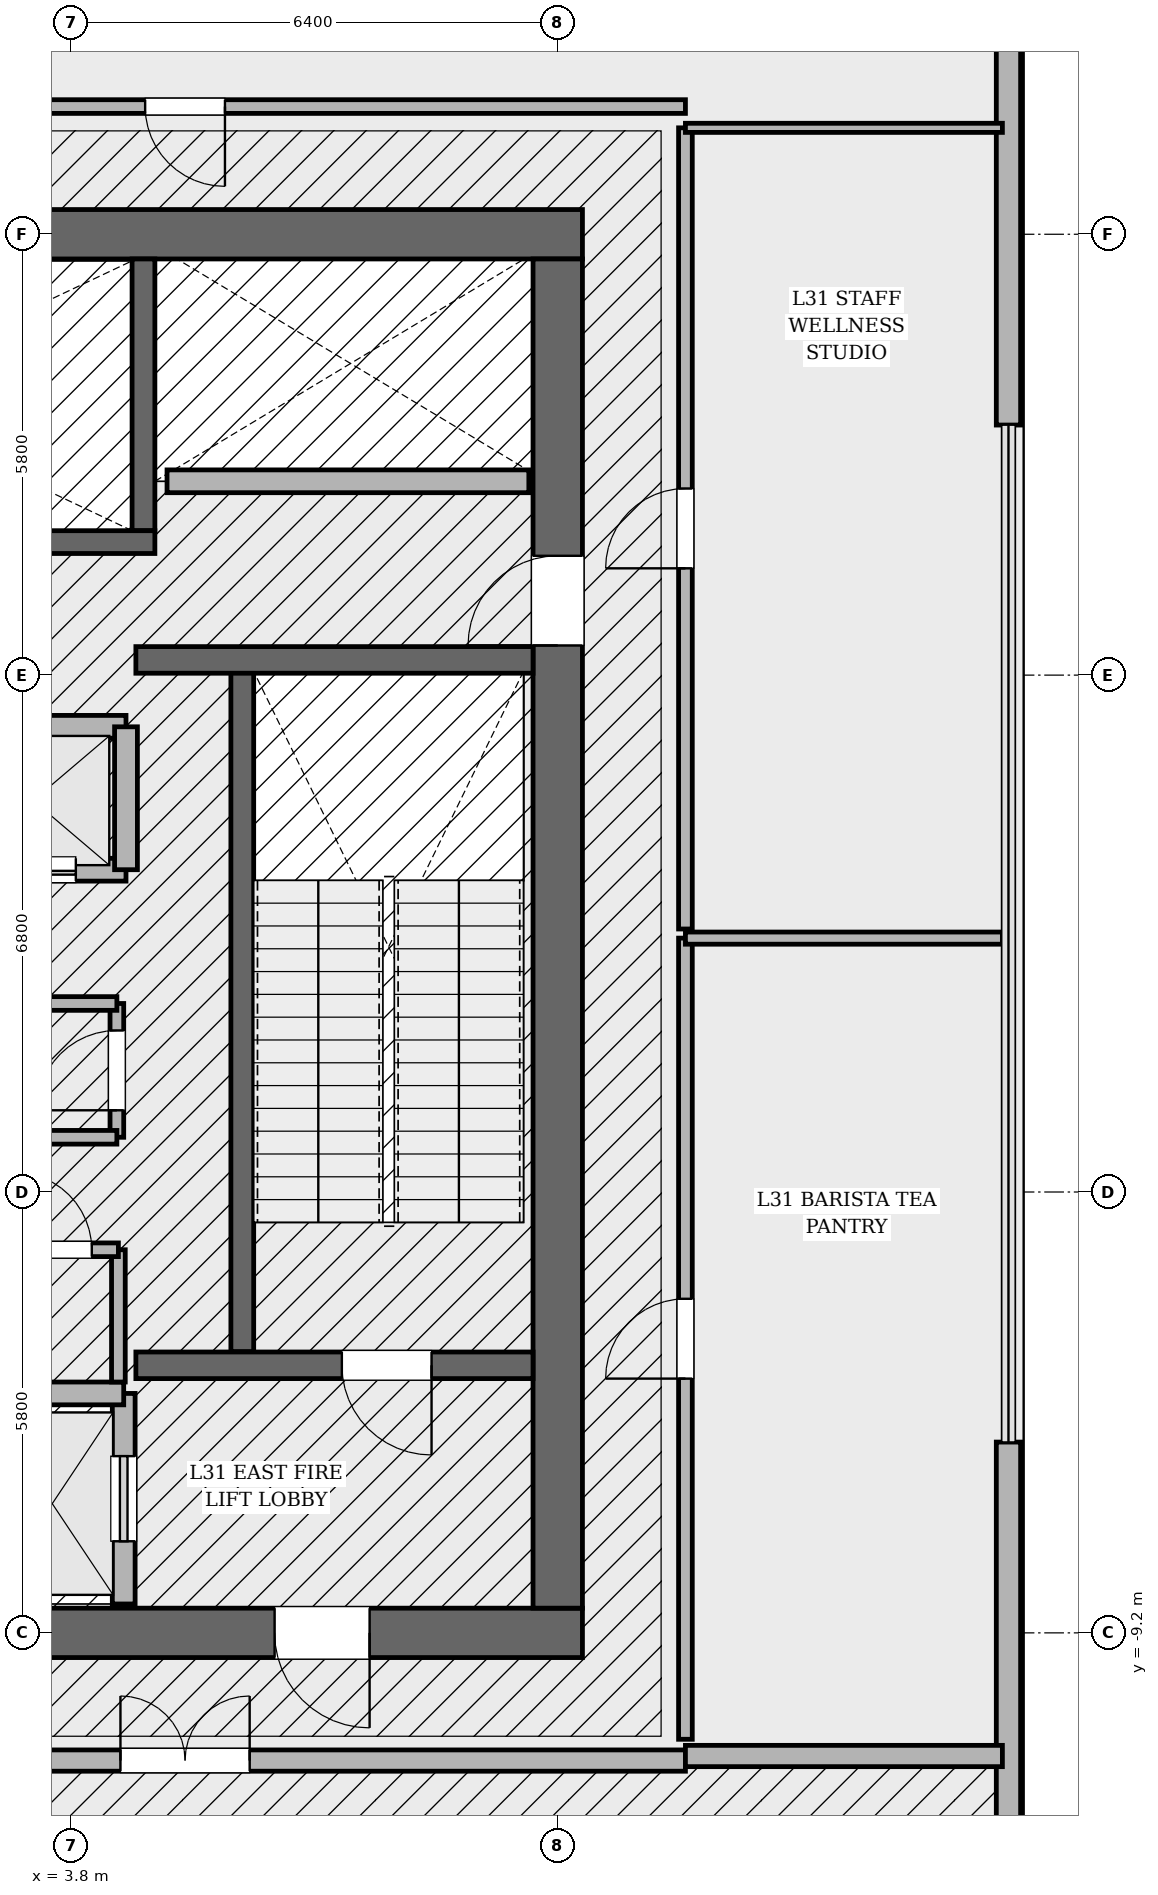
"""IFC4 building model, lengths in metres.
Left out: names, types, materials, properties, quantities, classifications, styles, units other than length and angle.
Written with IfcOpenShell. Run it as: python <this file> out.ifc"""

import sys

from ifc_helpers import new_model, si_unit, direction, frame, frame_2d, origin, place, context, subcontext, project, spatial, rectangle, extrude, element, fill, save


model = new_model("IFC4")
c1 = context("Model", 3, precision=1e-05, world=origin(), true_north=direction((0.0, 1.0)))
c2 = subcontext(c1, "Body", "Model", "MODEL_VIEW")
j1 = project(units=[si_unit("LENGTHUNIT", "METRE"), si_unit("PLANEANGLEUNIT", "RADIAN")], contexts=[c1])
p1 = place(None, origin())
s1 = spatial("IfcSite", under=j1, at=p1, CompositionType="ELEMENT")
p2 = place(p1, origin())
s2 = spatial("IfcBuilding", under=s1, at=p2, CompositionType="ELEMENT")
p3 = place(p2, frame((0.0, 0.0, 135.0)))
s3 = spatial("IfcBuildingStorey", under=s2, at=p3, CompositionType="ELEMENT", Elevation=135.0)
p4 = place(p3, frame((10.525, -9.2, 0.0), z_axis=(0.0, 0.0, 1.0), x_axis=(-1.0, 0.0, 0.0)))
e1 = element("IfcWall", 1, at=p4, inside=s3, PredefinedType="SHEAR", context=c2, shape_type="SweptSolid", body=[
    extrude(rectangle(XDim=21.05, YDim=0.65, at=frame_2d((10.525, 0.0))), origin(), (0.0, 0.0, 1.0), 4.8),
])
p5 = place(p4, frame((2.8, 0.0, 0.0)))
e2 = element("IfcOpeningElement", 2, at=p5, cuts=e1, PredefinedType="OPENING", context=c2, shape_type="SweptSolid", body=[
    extrude(rectangle(XDim=1.25, YDim=2.25, at=frame_2d((0.625, 1.125))), frame((0.0, 0.335, 0.0), z_axis=(0.0, -1.0, 0.0), x_axis=(1.0, 0.0, 0.0)), (0.0, 0.0, 1.0), 0.67),
])
p6 = place(p4, frame((17.0, 0.0, 0.0)))
e3 = element("IfcOpeningElement", 3, at=p6, cuts=e1, PredefinedType="OPENING", context=c2, shape_type="SweptSolid", body=[
    extrude(rectangle(XDim=1.25, YDim=2.25, at=frame_2d((0.625, 1.125))), frame((0.0, 0.335, 0.0), z_axis=(0.0, -1.0, 0.0), x_axis=(1.0, 0.0, 0.0)), (0.0, 0.0, 1.0), 0.67),
])
p7 = place(p3, frame((-10.525, 9.2, 0.0), z_axis=(0.0, 0.0, 1.0), x_axis=(1.0, 0.0, 0.0)))
e4 = element("IfcWall", 4, at=p7, inside=s3, PredefinedType="SHEAR", context=c2, shape_type="SweptSolid", body=[
    extrude(rectangle(XDim=21.05, YDim=0.65, at=frame_2d((10.525, 0.0))), origin(), (0.0, 0.0, 1.0), 4.8),
])
p8 = place(p3, frame((10.2, 8.875, 0.0), z_axis=(0.0, 0.0, 1.0), x_axis=(0.0, -1.0, 0.0)))
e5 = element("IfcWall", 5, at=p8, inside=s3, PredefinedType="SHEAR", context=c2, shape_type="SweptSolid", body=[
    extrude(rectangle(XDim=17.75, YDim=0.65, at=frame_2d((8.875, 0.0))), origin(), (0.0, 0.0, 1.0), 4.8),
])
p9 = place(p8, frame((3.905, 0.0, 0.0)))
e6 = element("IfcOpeningElement", 6, at=p9, cuts=e5, PredefinedType="OPENING", context=c2, shape_type="SweptSolid", body=[
    extrude(rectangle(XDim=1.18, YDim=2.2, at=frame_2d((0.59, 1.1))), frame((0.0, 0.335, 0.0), z_axis=(0.0, -1.0, 0.0), x_axis=(1.0, 0.0, 0.0)), (0.0, 0.0, 1.0), 0.67),
])
p10 = place(p3, frame((6.05, 3.45, 0.0), z_axis=(0.0, 0.0, 1.0), x_axis=(0.0, -1.0, 0.0)))
e7 = element("IfcWall", 7, at=p10, inside=s3, PredefinedType="SOLIDWALL", context=c2, shape_type="SweptSolid", body=[
    extrude(rectangle(XDim=8.95, YDim=0.3, at=frame_2d((4.475, 0.0))), origin(), (0.0, 0.0, 1.0), 4.8),
])
p11 = place(p3, frame((4.75, 8.875, 0.0), z_axis=(0.0, 0.0, 1.0), x_axis=(0.0, -1.0, 0.0)))
e8 = element("IfcWall", 8, at=p11, inside=s3, PredefinedType="SOLIDWALL", context=c2, shape_type="SweptSolid", body=[
    extrude(rectangle(XDim=3.575, YDim=0.3, at=frame_2d((1.788, 0.0))), origin(), (0.0, 0.0, 1.0), 4.8),
])
p12 = place(p3, frame((-4.9, 5.15, 0.0), z_axis=(0.0, 0.0, 1.0), x_axis=(1.0, 0.0, 0.0)))
e9 = element("IfcWall", 9, at=p12, inside=s3, PredefinedType="SOLIDWALL", context=c2, shape_type="SweptSolid", body=[
    extrude(rectangle(XDim=9.8, YDim=0.3, at=frame_2d((4.9, 0.0))), origin(), (0.0, 0.0, 1.0), 4.8),
])
p13 = place(p12, frame((0.56, 0.0, 0.0)))
e10 = element("IfcOpeningElement", 10, at=p13, cuts=e9, PredefinedType="OPENING", context=c2, shape_type="SweptSolid", body=[
    extrude(rectangle(XDim=1.18, YDim=2.2, at=frame_2d((0.59, 1.1))), frame((0.0, 0.16, 0.0), z_axis=(0.0, -1.0, 0.0), x_axis=(1.0, 0.0, 0.0)), (0.0, 0.0, 1.0), 0.32),
])
p14 = place(p3, frame((4.65, -5.68, 0.0), z_axis=(0.0, 0.0, 1.0), x_axis=(1.0, 0.0, 0.0)))
e11 = element("IfcWall", 11, at=p14, inside=s3, PredefinedType="SOLIDWALL", context=c2, shape_type="SweptSolid", body=[
    extrude(rectangle(XDim=5.225, YDim=0.35, at=frame_2d((2.613, 0.0))), origin(), (0.0, 0.0, 1.0), 4.8),
])
p15 = place(p14, frame((2.71, 0.0, 0.0)))
e12 = element("IfcOpeningElement", 12, at=p15, cuts=e11, PredefinedType="OPENING", context=c2, shape_type="SweptSolid", body=[
    extrude(rectangle(XDim=1.18, YDim=2.2, at=frame_2d((0.59, 1.1))), frame((0.0, 0.185, 0.0), z_axis=(0.0, -1.0, 0.0), x_axis=(1.0, 0.0, 0.0)), (0.0, 0.0, 1.0), 0.37),
])
p16 = place(p3, frame((4.65, 3.6, 0.0), z_axis=(0.0, 0.0, 1.0), x_axis=(1.0, 0.0, 0.0)))
e13 = element("IfcWall", 13, at=p16, inside=s3, PredefinedType="SOLIDWALL", context=c2, shape_type="SweptSolid", body=[
    extrude(rectangle(XDim=5.225, YDim=0.35, at=frame_2d((2.613, 0.0))), origin(), (0.0, 0.0, 1.0), 4.8),
])
for number, where, z_axis, x_axis in (
    (14, (16.13, -13.727, 0.0), (0.0, 0.0, 1.0), (0.0, 1.0, 0.0)),
    (15, (16.13, 6.69, 0.0), (0.0, 0.0, 1.0), (0.0, 1.0, 0.0)),
):
    element("IfcWall", number, at=place(p3, frame(where, z_axis=z_axis, x_axis=x_axis)), inside=s3, PredefinedType="SOLIDWALL", context=c2, shape_type="SweptSolid", body=[
        extrude(rectangle(XDim=7.037, YDim=0.32, at=frame_2d((3.519, 0.0))), origin(), (0.0, 0.0, 1.0), 3.194),
    ])
p17 = place(p3, frame((4.49, -8.82, 0.0), z_axis=(0.0, 0.0, 1.0), x_axis=(0.0, 1.0, 0.0)))
e16 = element("IfcWall", 16, at=p17, inside=s3, PredefinedType="SOLIDWALL", context=c2, shape_type="SweptSolid", body=[
    extrude(rectangle(XDim=2.77, YDim=0.3, at=frame_2d((1.385, 0.0))), origin(), (0.0, 0.0, 1.0), 4.52),
])
p18 = place(p17, frame((0.825, 0.0, 0.0)))
e17 = element("IfcOpeningElement", 17, at=p18, cuts=e16, PredefinedType="OPENING", context=c2, shape_type="SweptSolid", body=[
    extrude(rectangle(XDim=1.12, YDim=2.25, at=frame_2d((0.56, 1.125))), frame((0.0, 0.16, 0.0), z_axis=(0.0, -1.0, 0.0), x_axis=(1.0, 0.0, 0.0)), (0.0, 0.0, 1.0), 0.32),
])
p19 = place(p3, frame((2.61, -6.05, 0.0), z_axis=(0.0, 0.0, 1.0), x_axis=(1.0, 0.0, 0.0)))
e18 = element("IfcWall", 18, at=p19, inside=s3, PredefinedType="SOLIDWALL", context=c2, shape_type="SweptSolid", body=[
    extrude(rectangle(XDim=1.88, YDim=0.3, at=frame_2d((0.94, 0.0))), origin(), (0.0, 0.0, 1.0), 4.52),
])
p20 = place(p3, frame((-4.52, 0.84, 0.0), z_axis=(0.0, 0.0, 1.0), x_axis=(1.0, 0.0, 0.0)))
e19 = element("IfcWall", 19, at=p20, inside=s3, PredefinedType="SOLIDWALL", context=c2, shape_type="SweptSolid", body=[
    extrude(rectangle(XDim=9.04, YDim=0.3, at=frame_2d((4.52, 0.0))), origin(), (0.0, 0.0, 1.0), 4.52),
])
p21 = place(p20, frame((0.66, 0.0, 0.0)))
e20 = element("IfcOpeningElement", 20, at=p21, cuts=e19, PredefinedType="OPENING", context=c2, shape_type="SweptSolid", body=[
    extrude(rectangle(XDim=1.12, YDim=2.25, at=frame_2d((0.56, 1.125))), frame((0.0, 0.16, 0.0), z_axis=(0.0, -1.0, 0.0), x_axis=(1.0, 0.0, 0.0)), (0.0, 0.0, 1.0), 0.32),
])
p22 = place(p20, frame((2.86, 0.0, 0.0)))
e21 = element("IfcOpeningElement", 21, at=p22, cuts=e19, PredefinedType="OPENING", context=c2, shape_type="SweptSolid", body=[
    extrude(rectangle(XDim=1.12, YDim=2.25, at=frame_2d((0.56, 1.125))), frame((0.0, 0.16, 0.0), z_axis=(0.0, -1.0, 0.0), x_axis=(1.0, 0.0, 0.0)), (0.0, 0.0, 1.0), 0.32),
])
p23 = place(p20, frame((5.06, 0.0, 0.0)))
e22 = element("IfcOpeningElement", 22, at=p23, cuts=e19, PredefinedType="OPENING", context=c2, shape_type="SweptSolid", body=[
    extrude(rectangle(XDim=1.12, YDim=2.25, at=frame_2d((0.56, 1.125))), frame((0.0, 0.16, 0.0), z_axis=(0.0, -1.0, 0.0), x_axis=(1.0, 0.0, 0.0)), (0.0, 0.0, 1.0), 0.32),
])
p24 = place(p20, frame((7.26, 0.0, 0.0)))
e23 = element("IfcOpeningElement", 23, at=p24, cuts=e19, PredefinedType="OPENING", context=c2, shape_type="SweptSolid", body=[
    extrude(rectangle(XDim=1.12, YDim=2.25, at=frame_2d((0.56, 1.125))), frame((0.0, 0.16, 0.0), z_axis=(0.0, -1.0, 0.0), x_axis=(1.0, 0.0, 0.0)), (0.0, 0.0, 1.0), 0.32),
])
p25 = place(p3, frame((-4.52, 2.72, 0.0), z_axis=(0.0, 0.0, 1.0), x_axis=(1.0, 0.0, 0.0)))
e24 = element("IfcWall", 24, at=p25, inside=s3, PredefinedType="SOLIDWALL", context=c2, shape_type="SweptSolid", body=[
    extrude(rectangle(XDim=9.04, YDim=0.3, at=frame_2d((4.52, 0.0))), origin(), (0.0, 0.0, 1.0), 4.52),
])
p26 = place(p3, frame((4.52, 0.84, 0.0), z_axis=(0.0, 0.0, 1.0), x_axis=(0.0, 1.0, 0.0)))
e25 = element("IfcWall", 25, at=p26, inside=s3, PredefinedType="SOLIDWALL", context=c2, shape_type="SweptSolid", body=[
    extrude(rectangle(XDim=1.88, YDim=0.3, at=frame_2d((0.94, 0.0))), origin(), (0.0, 0.0, 1.0), 4.52),
])
p27 = place(p3, frame((5.06, 5.95, 0.0), z_axis=(0.0, 0.0, 1.0), x_axis=(1.0, 0.0, 0.0)))
e26 = element("IfcWall", 26, at=p27, inside=s3, PredefinedType="SOLIDWALL", context=c2, shape_type="SweptSolid", body=[
    extrude(rectangle(XDim=4.76, YDim=0.3, at=frame_2d((2.38, 0.0))), origin(), (0.0, 0.0, 1.0), 4.52),
])
p28 = place(p3, frame((4.42, -5.9, 0.0), z_axis=(0.0, 0.0, 1.0), x_axis=(0.0, 1.0, 0.0)))
e27 = element("IfcWall", 27, at=p28, inside=s3, PredefinedType="PARTITIONING", context=c2, shape_type="SweptSolid", body=[
    extrude(rectangle(XDim=1.74, YDim=0.18, at=frame_2d((0.87, 0.0))), origin(), (0.0, 0.0, 1.0), 4.52),
])
p29 = place(p3, frame((4.42, -4.16, 0.0), z_axis=(0.0, 0.0, 1.0), x_axis=(-1.0, 0.0, 0.0)))
e28 = element("IfcWall", 28, at=p29, inside=s3, PredefinedType="PARTITIONING", context=c2, shape_type="SweptSolid", body=[
    extrude(rectangle(XDim=1.72, YDim=0.18, at=frame_2d((0.86, 0.0))), origin(), (0.0, 0.0, 1.0), 4.52),
])
p30 = place(p29, frame((0.35, 0.0, 0.0)))
e29 = element("IfcOpeningElement", 29, at=p30, cuts=e28, PredefinedType="OPENING", context=c2, shape_type="SweptSolid", body=[
    extrude(rectangle(XDim=1.02, YDim=2.2, at=frame_2d((0.51, 1.1))), frame((0.0, 0.1, 0.0), z_axis=(0.0, -1.0, 0.0), x_axis=(1.0, 0.0, 0.0)), (0.0, 0.0, 1.0), 0.2),
])
p31 = place(p3, frame((4.4, -2.68, 0.0), z_axis=(0.0, 0.0, 1.0), x_axis=(0.0, 1.0, 0.0)))
e30 = element("IfcWall", 30, at=p31, inside=s3, PredefinedType="PARTITIONING", context=c2, shape_type="SweptSolid", body=[
    extrude(rectangle(XDim=1.76, YDim=0.18, at=frame_2d((0.88, 0.0))), origin(), (0.0, 0.0, 1.0), 4.52),
])
p32 = place(p31, frame((0.355, 0.0, 0.0)))
e31 = element("IfcOpeningElement", 31, at=p32, cuts=e30, PredefinedType="OPENING", context=c2, shape_type="SweptSolid", body=[
    extrude(rectangle(XDim=1.05, YDim=2.2, at=frame_2d((0.525, 1.1))), frame((0.0, 0.1, 0.0), z_axis=(0.0, -1.0, 0.0), x_axis=(1.0, 0.0, 0.0)), (0.0, 0.0, 1.0), 0.2),
])
for number, where, z_axis, x_axis in (
    (32, (4.4, -0.92, 0.0), (0.0, 0.0, 1.0), (-1.0, 0.0, 0.0)),
    (33, (1.6, -2.68, 0.0), (0.0, 0.0, 1.0), (1.0, 0.0, 0.0)),
):
    element("IfcWall", number, at=place(p3, frame(where, z_axis=z_axis, x_axis=x_axis)), inside=s3, PredefinedType="PARTITIONING", context=c2, shape_type="SweptSolid", body=[
        extrude(rectangle(XDim=2.8, YDim=0.18, at=frame_2d((1.4, 0.0))), origin(), (0.0, 0.0, 1.0), 4.52),
    ])
p33 = place(p3, frame((-1.286, -10.88, 0.0), z_axis=(0.0, 0.0, 1.0), x_axis=(1.0, 0.0, 0.0)))
e34 = element("IfcWall", 34, at=p33, inside=s3, PredefinedType="SOLIDWALL", context=c2, shape_type="SweptSolid", body=[
    extrude(rectangle(XDim=13.166, YDim=0.28, at=frame_2d((6.583, 0.0))), origin(), (0.0, 0.0, 1.0), 3.194),
])
p34 = place(p33, frame((5.733, 0.0, 0.0)))
e35 = element("IfcOpeningElement", 35, at=p34, cuts=e34, PredefinedType="OPENING", context=c2, shape_type="SweptSolid", body=[
    extrude(rectangle(XDim=1.7, YDim=2.3, at=frame_2d((0.85, 1.15))), frame((0.0, 0.15, 0.0), z_axis=(0.0, -1.0, 0.0), x_axis=(1.0, 0.0, 0.0)), (0.0, 0.0, 1.0), 0.3),
])
p35 = place(p3, frame((11.88, -10.82, 0.0), z_axis=(0.0, 0.0, 1.0), x_axis=(1.0, 0.0, 0.0)))
e36 = element("IfcWall", 36, at=p35, inside=s3, PredefinedType="SOLIDWALL", context=c2, shape_type="SweptSolid", body=[
    extrude(rectangle(XDim=4.17, YDim=0.28, at=frame_2d((2.085, 0.0))), origin(), (0.0, 0.0, 1.0), 4.114),
])
p36 = place(p3, frame((11.88, -10.6, 0.0), z_axis=(0.0, 0.0, 1.0), x_axis=(0.0, 1.0, 0.0)))
e37 = element("IfcWall", 37, at=p36, inside=s3, PredefinedType="PARTITIONING", context=c2, shape_type="SweptSolid", body=[
    extrude(rectangle(XDim=10.54, YDim=0.18, at=frame_2d((5.27, 0.0))), origin(), (0.0, 0.0, 1.0), 3.194),
])
p37 = place(p36, frame((4.745, 0.0, 0.0)))
e38 = element("IfcOpeningElement", 38, at=p37, cuts=e37, PredefinedType="OPENING", context=c2, shape_type="SweptSolid", body=[
    extrude(rectangle(XDim=1.05, YDim=2.2, at=frame_2d((0.525, 1.1))), frame((0.0, 0.1, 0.0), z_axis=(0.0, -1.0, 0.0), x_axis=(1.0, 0.0, 0.0)), (0.0, 0.0, 1.0), 0.2),
])
p38 = place(p3, frame((11.88, -0.06, 0.0), z_axis=(0.0, 0.0, 1.0), x_axis=(1.0, 0.0, 0.0)))
e39 = element("IfcWall", 39, at=p38, inside=s3, PredefinedType="PARTITIONING", context=c2, shape_type="SweptSolid", body=[
    extrude(rectangle(XDim=4.17, YDim=0.16, at=frame_2d((2.085, 0.0))), origin(), (0.0, 0.0, 1.0), 4.52),
])
p39 = place(p3, frame((11.88, 0.06, 0.0), z_axis=(0.0, 0.0, 1.0), x_axis=(0.0, 1.0, 0.0)))
e40 = element("IfcWall", 40, at=p39, inside=s3, PredefinedType="PARTITIONING", context=c2, shape_type="SweptSolid", body=[
    extrude(rectangle(XDim=10.54, YDim=0.18, at=frame_2d((5.27, 0.0))), origin(), (0.0, 0.0, 1.0), 3.194),
])
p40 = place(p39, frame((4.745, 0.0, 0.0)))
e41 = element("IfcOpeningElement", 41, at=p40, cuts=e40, PredefinedType="OPENING", context=c2, shape_type="SweptSolid", body=[
    extrude(rectangle(XDim=1.05, YDim=2.2, at=frame_2d((0.525, 1.1))), frame((0.0, 0.1, 0.0), z_axis=(0.0, -1.0, 0.0), x_axis=(1.0, 0.0, 0.0)), (0.0, 0.0, 1.0), 0.2),
])
p41 = place(p3, frame((11.88, 10.6, 0.0), z_axis=(0.0, 0.0, 1.0), x_axis=(1.0, 0.0, 0.0)))
e42 = element("IfcWall", 42, at=p41, inside=s3, PredefinedType="PARTITIONING", context=c2, shape_type="SweptSolid", body=[
    extrude(rectangle(XDim=4.17, YDim=0.12, at=frame_2d((2.085, 0.0))), origin(), (0.0, 0.0, 1.0), 4.114),
])
p42 = place(p3, frame((11.88, 10.88, 0.0), z_axis=(0.0, 0.0, 1.0), x_axis=(-1.0, 0.0, 0.0)))
e43 = element("IfcWall", 43, at=p42, inside=s3, PredefinedType="PARTITIONING", context=c2, shape_type="SweptSolid", body=[
    extrude(rectangle(XDim=13.166, YDim=0.18, at=frame_2d((6.583, 0.0))), origin(), (0.0, 0.0, 1.0), 3.194),
])
p43 = place(p42, frame((6.058, 0.0, 0.0)))
e44 = element("IfcOpeningElement", 44, at=p43, cuts=e43, PredefinedType="OPENING", context=c2, shape_type="SweptSolid", body=[
    extrude(rectangle(XDim=1.05, YDim=2.2, at=frame_2d((0.525, 1.1))), frame((0.0, 0.1, 0.0), z_axis=(0.0, -1.0, 0.0), x_axis=(1.0, 0.0, 0.0)), (0.0, 0.0, 1.0), 0.2),
])
p44 = place(p15, origin())
e45 = element("IfcDoor", 45, at=p44, inside=s3, OperationType="SINGLE_SWING_RIGHT", PredefinedType="DOOR", context=c2, shape_type="SweptSolid", body=[
    extrude(rectangle(XDim=1.18, YDim=2.2, at=frame_2d((0.59, 1.1))), frame((0.0, 0.025, 0.0), z_axis=(0.0, -1.0, 0.0), x_axis=(1.0, 0.0, 0.0)), (0.0, 0.0, 1.0), 0.05),
])
fill(e12, e45)
p45 = place(p5, origin())
e46 = element("IfcDoor", 46, at=p45, inside=s3, OperationType="SINGLE_SWING_LEFT", PredefinedType="DOOR", context=c2, shape_type="SweptSolid", body=[
    extrude(rectangle(XDim=1.25, YDim=2.25, at=frame_2d((0.625, 1.125))), frame((0.0, 0.025, 0.0), z_axis=(0.0, -1.0, 0.0), x_axis=(1.0, 0.0, 0.0)), (0.0, 0.0, 1.0), 0.05),
])
fill(e2, e46)
p46 = place(p9, origin())
e47 = element("IfcDoor", 47, at=p46, inside=s3, OperationType="SINGLE_SWING_RIGHT", PredefinedType="DOOR", context=c2, shape_type="SweptSolid", body=[
    extrude(rectangle(XDim=1.18, YDim=2.2, at=frame_2d((0.59, 1.1))), frame((0.0, 0.025, 0.0), z_axis=(0.0, -1.0, 0.0), x_axis=(1.0, 0.0, 0.0)), (0.0, 0.0, 1.0), 0.05),
])
fill(e6, e47)
p47 = place(p18, origin())
e48 = element("IfcDoor", 48, at=p47, inside=s3, OperationType="SLIDING_TO_RIGHT", PredefinedType="DOOR", context=c2, shape_type="SweptSolid", body=[
    extrude(rectangle(XDim=1.12, YDim=2.25, at=frame_2d((0.56, 1.125))), frame((0.0, 0.025, 0.0), z_axis=(0.0, -1.0, 0.0), x_axis=(1.0, 0.0, 0.0)), (0.0, 0.0, 1.0), 0.05),
])
fill(e17, e48)
p48 = place(p24, origin())
e49 = element("IfcDoor", 49, at=p48, inside=s3, OperationType="DOUBLE_DOOR_SLIDING", PredefinedType="DOOR", context=c2, shape_type="SweptSolid", body=[
    extrude(rectangle(XDim=1.12, YDim=2.25, at=frame_2d((0.56, 1.125))), frame((0.0, 0.025, 0.0), z_axis=(0.0, -1.0, 0.0), x_axis=(1.0, 0.0, 0.0)), (0.0, 0.0, 1.0), 0.05),
])
fill(e23, e49)
p49 = place(p30, origin())
e50 = element("IfcDoor", 50, at=p49, inside=s3, OperationType="SINGLE_SWING_RIGHT", PredefinedType="DOOR", context=c2, shape_type="SweptSolid", body=[
    extrude(rectangle(XDim=1.02, YDim=2.2, at=frame_2d((0.51, 1.1))), frame((0.0, 0.025, 0.0), z_axis=(0.0, -1.0, 0.0), x_axis=(1.0, 0.0, 0.0)), (0.0, 0.0, 1.0), 0.05),
])
fill(e29, e50)
p50 = place(p32, origin())
e51 = element("IfcDoor", 51, at=p50, inside=s3, OperationType="SINGLE_SWING_LEFT", PredefinedType="DOOR", context=c2, shape_type="SweptSolid", body=[
    extrude(rectangle(XDim=1.05, YDim=2.2, at=frame_2d((0.525, 1.1))), frame((0.0, 0.025, 0.0), z_axis=(0.0, -1.0, 0.0), x_axis=(1.0, 0.0, 0.0)), (0.0, 0.0, 1.0), 0.05),
])
fill(e31, e51)
p51 = place(p34, origin())
e52 = element("IfcDoor", 52, at=p51, inside=s3, OperationType="DOUBLE_DOOR_SINGLE_SWING", PredefinedType="DOOR", context=c2, shape_type="SweptSolid", body=[
    extrude(rectangle(XDim=1.7, YDim=2.3, at=frame_2d((0.85, 1.15))), frame((0.0, 0.025, 0.0), z_axis=(0.0, -1.0, 0.0), x_axis=(1.0, 0.0, 0.0)), (0.0, 0.0, 1.0), 0.05),
])
fill(e35, e52)
p52 = place(p37, origin())
e53 = element("IfcDoor", 53, at=p52, inside=s3, OperationType="SINGLE_SWING_LEFT", PredefinedType="DOOR", context=c2, shape_type="SweptSolid", body=[
    extrude(rectangle(XDim=1.05, YDim=2.2, at=frame_2d((0.525, 1.1))), frame((0.0, 0.025, 0.0), z_axis=(0.0, -1.0, 0.0), x_axis=(1.0, 0.0, 0.0)), (0.0, 0.0, 1.0), 0.05),
])
fill(e38, e53)
p53 = place(p40, origin())
e54 = element("IfcDoor", 54, at=p53, inside=s3, OperationType="SINGLE_SWING_LEFT", PredefinedType="DOOR", context=c2, shape_type="SweptSolid", body=[
    extrude(rectangle(XDim=1.05, YDim=2.2, at=frame_2d((0.525, 1.1))), frame((0.0, 0.025, 0.0), z_axis=(0.0, -1.0, 0.0), x_axis=(1.0, 0.0, 0.0)), (0.0, 0.0, 1.0), 0.05),
])
fill(e41, e54)
p54 = place(p43, origin())
e55 = element("IfcDoor", 55, at=p54, inside=s3, OperationType="SINGLE_SWING_LEFT", PredefinedType="DOOR", context=c2, shape_type="SweptSolid", body=[
    extrude(rectangle(XDim=1.05, YDim=2.2, at=frame_2d((0.525, 1.1))), frame((0.0, 0.025, 0.0), z_axis=(0.0, -1.0, 0.0), x_axis=(1.0, 0.0, 0.0)), (0.0, 0.0, 1.0), 0.05),
])
fill(e44, e55)
save(model, sys.argv[1])
